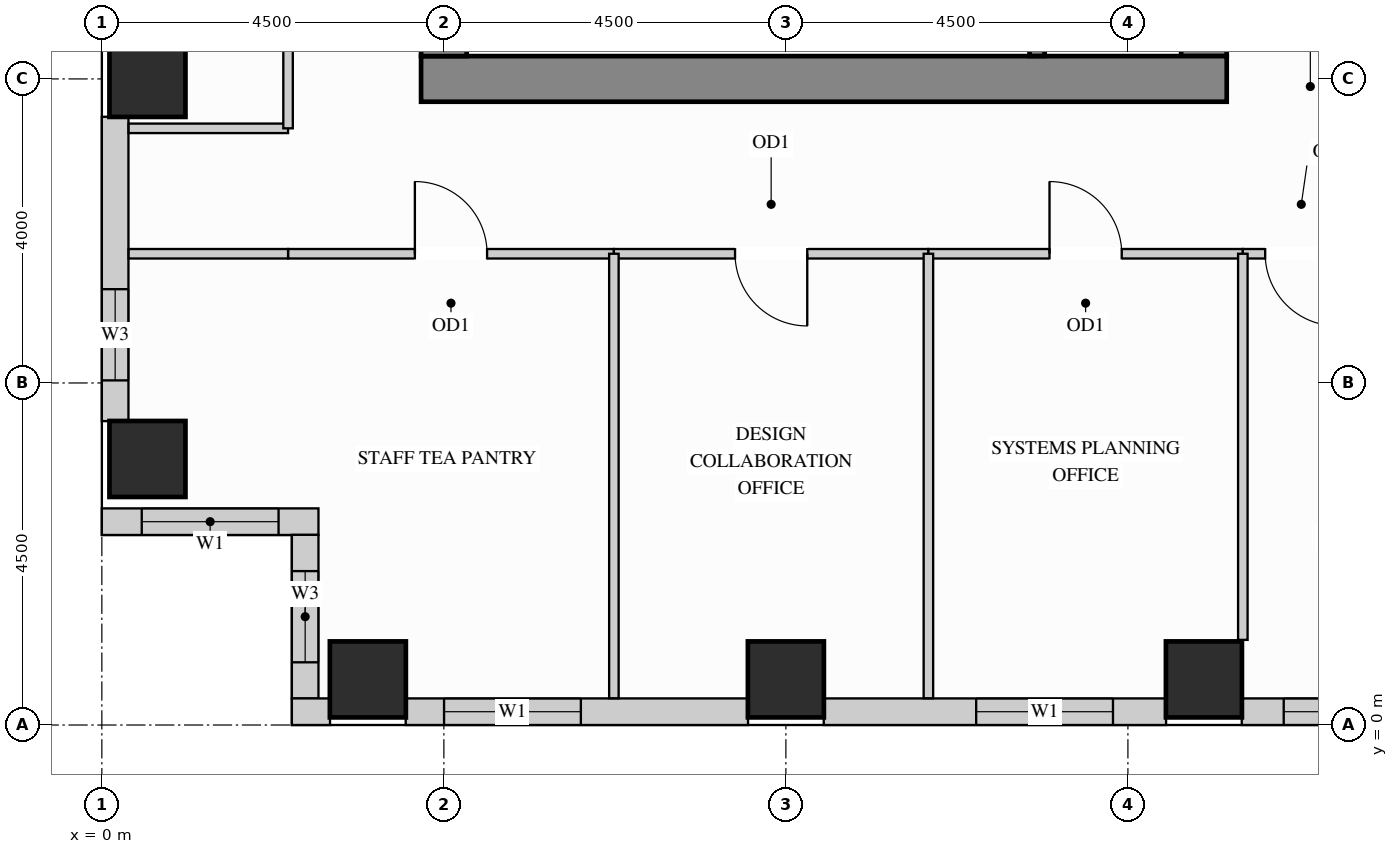
"""IFC4 building model, lengths in metres.
Left out: names, types, materials, properties, quantities, classifications, styles, units other than length and angle.
Written with IfcOpenShell. Run it as: python <this file> out.ifc"""

import sys

from ifc_helpers import new_model, si_unit, direction, frame, frame_2d, origin, origin_2d, place, context, subcontext, project, spatial, rectangle, extrude, source, transform, mapped, element, fill, save


model = new_model("IFC4")
c1 = context("Model", 3, precision=1e-05, world=origin(), true_north=direction((0.0, 1.0)))
c2 = subcontext(c1, "Body", "Model", "MODEL_VIEW")
j1 = project(units=[si_unit("LENGTHUNIT", "METRE"), si_unit("PLANEANGLEUNIT", "RADIAN")], contexts=[c1])
p1 = place(None, origin())
s1 = spatial("IfcSite", under=j1, at=p1, CompositionType="ELEMENT")
p2 = place(p1, origin())
s2 = spatial("IfcBuilding", under=s1, at=p2, CompositionType="ELEMENT")
p3 = place(p2, frame((0.0, 0.0, 189.9)))
s3 = spatial("IfcBuildingStorey", under=s2, at=p3, CompositionType="ELEMENT", Elevation=189.9)
m1 = source(origin(), c2, "Body", "SweptSolid", [
    extrude(rectangle(XDim=1.0, YDim=1.0, at=origin_2d()), origin(), (0.0, 0.0, 1.0), 3.4),
])
for number, where, z_axis, x_axis in (
    (1, (14.5, 0.6, 0.0), (0.0, 0.0, 1.0), (1.0, 0.0, 0.0)),
    (2, (3.5, 0.6, 0.0), (0.0, 0.0, 1.0), (1.0, 0.0, 0.0)),
    (3, (9.0, 0.6, 0.0), (0.0, 0.0, 1.0), (1.0, 0.0, 0.0)),
    (4, (0.6, 3.5, 0.0), (0.0, 0.0, 1.0), (1.0, 0.0, 0.0)),
    (5, (0.6, 8.5, 0.0), (0.0, 0.0, 1.0), (1.0, 0.0, 0.0)),
):
    element("IfcColumn", number, at=place(p3, frame(where, z_axis=z_axis, x_axis=x_axis)), inside=s3, PredefinedType="COLUMN", context=c2, shape_type="MappedRepresentation", body=[
        mapped(m1, transform((0.0, 0.0, 0.0), x_axis=(1.0, 0.0, 0.0), y_axis=(0.0, 1.0, 0.0), z_axis=(0.0, 0.0, 1.0))),
    ])
m2 = source(origin(), c2, "Body", "SweptSolid", [
    extrude(rectangle(XDim=10.02, YDim=0.6, at=frame_2d((5.01, 0.0))), origin(), (0.0, 0.0, 1.0), 3.4),
])
p4 = place(p3, frame((14.5, 8.8, 0.0), z_axis=(0.0, 0.0, 1.0), x_axis=(0.0, 1.0, 0.0)))
e6 = element("IfcWall", 6, at=p4, inside=s3, PredefinedType="SHEAR", context=c2, shape_type="MappedRepresentation", body=[
    mapped(m2, transform((0.0, 0.0, 0.0), x_axis=(1.0, 0.0, 0.0), y_axis=(0.0, 1.0, 0.0), z_axis=(0.0, 0.0, 1.0))),
])
m3 = source(origin(), c2, "Body", "SweptSolid", [
    extrude(rectangle(XDim=10.6, YDim=0.6, at=frame_2d((5.3, 0.0))), origin(), (0.0, 0.0, 1.0), 3.4),
])
p5 = place(p3, frame((4.2, 8.5, 0.0), z_axis=(0.0, 0.0, 1.0), x_axis=(1.0, 0.0, 0.0)))
e7 = element("IfcWall", 7, at=p5, inside=s3, PredefinedType="SHEAR", context=c2, shape_type="MappedRepresentation", body=[
    mapped(m3, transform((0.0, 0.0, 0.0), x_axis=(1.0, 0.0, 0.0), y_axis=(0.0, 1.0, 0.0), z_axis=(0.0, 0.0, 1.0))),
])
m4 = source(origin(), c2, "Body", "SweptSolid", [
    extrude(rectangle(XDim=20.4, YDim=0.6, at=frame_2d((10.2, 0.0))), origin(), (0.0, 0.0, 1.0), 3.4),
])
p6 = place(p3, frame((4.5, 8.8, 0.0), z_axis=(0.0, 0.0, 1.0), x_axis=(0.0, 1.0, 0.0)))
e8 = element("IfcWall", 8, at=p6, inside=s3, PredefinedType="SHEAR", context=c2, shape_type="MappedRepresentation", body=[
    mapped(m4, transform((0.0, 0.0, 0.0), x_axis=(1.0, 0.0, 0.0), y_axis=(0.0, 1.0, 0.0), z_axis=(0.0, 0.0, 1.0))),
])
p7 = place(p3, frame((0.175, 8.002, 0.0), z_axis=(0.0, 0.0, 1.0), x_axis=(0.0, -1.0, 0.0)))
e9 = element("IfcWall", 9, at=p7, inside=s3, PredefinedType="SOLIDWALL", context=c2, shape_type="SweptSolid", body=[
    extrude(rectangle(XDim=4.004, YDim=0.35, at=frame_2d((2.002, 0.0))), origin(), (0.0, 0.0, 1.0), 2.612),
])
p8 = place(p7, frame((2.268, 0.0, 0.78)))
e10 = element("IfcOpeningElement", 10, at=p8, cuts=e9, PredefinedType="OPENING", context=c2, shape_type="SweptSolid", body=[
    extrude(rectangle(XDim=1.2, YDim=1.652, at=frame_2d((0.6, 0.826))), frame((0.0, 0.185, 0.0), z_axis=(0.0, -1.0, 0.0), x_axis=(1.0, 0.0, 0.0)), (0.0, 0.0, 1.0), 0.37),
])
p9 = place(p3, frame((0.0, 2.675, 0.0), z_axis=(0.0, 0.0, 1.0), x_axis=(1.0, 0.0, 0.0)))
e11 = element("IfcWall", 11, at=p9, inside=s3, PredefinedType="SOLIDWALL", context=c2, shape_type="SweptSolid", body=[
    extrude(rectangle(XDim=2.85, YDim=0.35, at=frame_2d((1.425, 0.0))), origin(), (0.0, 0.0, 1.0), 3.385),
])
p10 = place(p9, frame((0.525, 0.0, 0.78)))
e12 = element("IfcOpeningElement", 12, at=p10, cuts=e11, PredefinedType="OPENING", context=c2, shape_type="SweptSolid", body=[
    extrude(rectangle(XDim=1.8, YDim=2.1, at=frame_2d((0.9, 1.05))), frame((0.0, 0.185, 0.0), z_axis=(0.0, -1.0, 0.0), x_axis=(1.0, 0.0, 0.0)), (0.0, 0.0, 1.0), 0.37),
])
p11 = place(p3, frame((2.675, 2.502, 0.0), z_axis=(0.0, 0.0, 1.0), x_axis=(0.0, -1.0, 0.0)))
e13 = element("IfcWall", 13, at=p11, inside=s3, PredefinedType="SOLIDWALL", context=c2, shape_type="SweptSolid", body=[
    extrude(rectangle(XDim=2.154, YDim=0.35, at=frame_2d((1.077, 0.0))), origin(), (0.0, 0.0, 1.0), 3.385),
])
p12 = place(p11, frame((0.477, 0.0, 0.78)))
e14 = element("IfcOpeningElement", 14, at=p12, cuts=e13, PredefinedType="OPENING", context=c2, shape_type="SweptSolid", body=[
    extrude(rectangle(XDim=1.2, YDim=2.1, at=frame_2d((0.6, 1.05))), frame((0.0, 0.185, 0.0), z_axis=(0.0, -1.0, 0.0), x_axis=(1.0, 0.0, 0.0)), (0.0, 0.0, 1.0), 0.37),
])
m5 = source(origin(), c2, "Body", "SweptSolid", [
    extrude(rectangle(XDim=0.502, YDim=0.35, at=frame_2d((0.251, 0.0))), origin(), (0.0, 0.0, 1.0), 3.385),
])
p13 = place(p3, frame((2.5, 0.175, 0.0), z_axis=(0.0, 0.0, 1.0), x_axis=(1.0, 0.0, 0.0)))
e15 = element("IfcWall", 15, at=p13, inside=s3, PredefinedType="SOLIDWALL", context=c2, shape_type="MappedRepresentation", body=[
    mapped(m5, transform((0.0, 0.0, 0.0), x_axis=(1.0, 0.0, 0.0), y_axis=(0.0, 1.0, 0.0), z_axis=(0.0, 0.0, 1.0))),
])
p14 = place(p3, frame((3.998, 0.175, 0.0), z_axis=(0.0, 0.0, 1.0), x_axis=(1.0, 0.0, 0.0)))
e16 = element("IfcWall", 16, at=p14, inside=s3, PredefinedType="SOLIDWALL", context=c2, shape_type="SweptSolid", body=[
    extrude(rectangle(XDim=4.504, YDim=0.35, at=frame_2d((2.252, 0.0))), origin(), (0.0, 0.0, 1.0), 2.612),
])
p15 = place(p14, frame((0.504, 0.0, 0.78)))
e17 = element("IfcOpeningElement", 17, at=p15, cuts=e16, PredefinedType="OPENING", context=c2, shape_type="SweptSolid", body=[
    extrude(rectangle(XDim=1.8, YDim=1.652, at=frame_2d((0.9, 0.826))), frame((0.0, 0.185, 0.0), z_axis=(0.0, -1.0, 0.0), x_axis=(1.0, 0.0, 0.0)), (0.0, 0.0, 1.0), 0.37),
])
p16 = place(p3, frame((9.498, 0.175, 0.0), z_axis=(0.0, 0.0, 1.0), x_axis=(1.0, 0.0, 0.0)))
e18 = element("IfcWall", 18, at=p16, inside=s3, PredefinedType="SOLIDWALL", context=c2, shape_type="SweptSolid", body=[
    extrude(rectangle(XDim=4.504, YDim=0.35, at=frame_2d((2.252, 0.0))), origin(), (0.0, 0.0, 1.0), 2.612),
])
p17 = place(p16, frame((2.006, 0.0, 0.78)))
e19 = element("IfcOpeningElement", 19, at=p17, cuts=e18, PredefinedType="OPENING", context=c2, shape_type="SweptSolid", body=[
    extrude(rectangle(XDim=1.8, YDim=1.652, at=frame_2d((0.9, 0.826))), frame((0.0, 0.185, 0.0), z_axis=(0.0, -1.0, 0.0), x_axis=(1.0, 0.0, 0.0)), (0.0, 0.0, 1.0), 0.37),
])
p18 = place(p3, frame((14.998, 0.175, 0.0), z_axis=(0.0, 0.0, 1.0), x_axis=(1.0, 0.0, 0.0)))
e20 = element("IfcWall", 20, at=p18, inside=s3, PredefinedType="SOLIDWALL", context=c2, shape_type="SweptSolid", body=[
    extrude(rectangle(XDim=3.504, YDim=0.35, at=frame_2d((1.752, 0.0))), origin(), (0.0, 0.0, 1.0), 2.612),
])
p19 = place(p18, frame((0.552, 0.0, 0.78)))
e21 = element("IfcOpeningElement", 21, at=p19, cuts=e20, PredefinedType="OPENING", context=c2, shape_type="SweptSolid", body=[
    extrude(rectangle(XDim=2.4, YDim=1.652, at=frame_2d((1.2, 0.826))), frame((0.0, 0.185, 0.0), z_axis=(0.0, -1.0, 0.0), x_axis=(1.0, 0.0, 0.0)), (0.0, 0.0, 1.0), 0.37),
])
m6 = source(origin(), c2, "Body", "SweptSolid", [
    extrude(rectangle(XDim=2.098, YDim=0.125, at=frame_2d((1.049, 0.0))), origin(), (0.0, 0.0, 1.0), 3.385),
])
p20 = place(p3, frame((0.352, 7.85, 0.0), z_axis=(0.0, 0.0, 1.0), x_axis=(1.0, 0.0, 0.0)))
e22 = element("IfcWall", 22, at=p20, inside=s3, PredefinedType="PARTITIONING", context=c2, shape_type="MappedRepresentation", body=[
    mapped(m6, transform((0.0, 0.0, 0.0), x_axis=(1.0, 0.0, 0.0), y_axis=(0.0, 1.0, 0.0), z_axis=(0.0, 0.0, 1.0))),
])
p21 = place(p3, frame((2.45, 6.2, 0.0), z_axis=(0.0, 0.0, 1.0), x_axis=(1.0, 0.0, 0.0)))
e23 = element("IfcWall", 23, at=p21, inside=s3, PredefinedType="PARTITIONING", context=c2, shape_type="SweptSolid", body=[
    extrude(rectangle(XDim=4.287, YDim=0.125, at=frame_2d((2.144, 0.0))), origin(), (0.0, 0.0, 1.0), 2.848),
])
p22 = place(p21, frame((1.668, 0.0, 0.0)))
e24 = element("IfcOpeningElement", 24, at=p22, cuts=e23, PredefinedType="OPENING", context=c2, shape_type="SweptSolid", body=[
    extrude(rectangle(XDim=0.95, YDim=2.15, at=frame_2d((0.475, 1.075))), frame((0.0, 0.073, 0.0), z_axis=(0.0, -1.0, 0.0), x_axis=(1.0, 0.0, 0.0)), (0.0, 0.0, 1.0), 0.145),
])
p23 = place(p3, frame((6.737, 6.2, 0.0), z_axis=(0.0, 0.0, 1.0), x_axis=(1.0, 0.0, 0.0)))
e25 = element("IfcWall", 25, at=p23, inside=s3, PredefinedType="PARTITIONING", context=c2, shape_type="SweptSolid", body=[
    extrude(rectangle(XDim=4.138, YDim=0.125, at=frame_2d((2.069, 0.0))), origin(), (0.0, 0.0, 1.0), 2.848),
])
p24 = place(p23, frame((1.594, 0.0, 0.0)))
e26 = element("IfcOpeningElement", 26, at=p24, cuts=e25, PredefinedType="OPENING", context=c2, shape_type="SweptSolid", body=[
    extrude(rectangle(XDim=0.95, YDim=2.15, at=frame_2d((0.475, 1.075))), frame((0.0, 0.073, 0.0), z_axis=(0.0, -1.0, 0.0), x_axis=(1.0, 0.0, 0.0)), (0.0, 0.0, 1.0), 0.145),
])
p25 = place(p3, frame((10.875, 6.2, 0.0), z_axis=(0.0, 0.0, 1.0), x_axis=(1.0, 0.0, 0.0)))
e27 = element("IfcWall", 27, at=p25, inside=s3, PredefinedType="PARTITIONING", context=c2, shape_type="SweptSolid", body=[
    extrude(rectangle(XDim=4.137, YDim=0.125, at=frame_2d((2.068, 0.0))), origin(), (0.0, 0.0, 1.0), 2.848),
])
p26 = place(p25, frame((1.594, 0.0, 0.0)))
e28 = element("IfcOpeningElement", 28, at=p26, cuts=e27, PredefinedType="OPENING", context=c2, shape_type="SweptSolid", body=[
    extrude(rectangle(XDim=0.95, YDim=2.15, at=frame_2d((0.475, 1.075))), frame((0.0, 0.073, 0.0), z_axis=(0.0, -1.0, 0.0), x_axis=(1.0, 0.0, 0.0)), (0.0, 0.0, 1.0), 0.145),
])
p27 = place(p3, frame((15.012, 6.2, 0.0), z_axis=(0.0, 0.0, 1.0), x_axis=(1.0, 0.0, 0.0)))
e29 = element("IfcWall", 29, at=p27, inside=s3, PredefinedType="PARTITIONING", context=c2, shape_type="SweptSolid", body=[
    extrude(rectangle(XDim=1.538, YDim=0.125, at=frame_2d((0.769, 0.0))), origin(), (0.0, 0.0, 1.0), 2.848),
])
p28 = place(p27, frame((0.294, 0.0, 0.0)))
e30 = element("IfcOpeningElement", 30, at=p28, cuts=e29, PredefinedType="OPENING", context=c2, shape_type="SweptSolid", body=[
    extrude(rectangle(XDim=0.95, YDim=2.15, at=frame_2d((0.475, 1.075))), frame((0.0, 0.073, 0.0), z_axis=(0.0, -1.0, 0.0), x_axis=(1.0, 0.0, 0.0)), (0.0, 0.0, 1.0), 0.145),
])
m7 = source(origin(), c2, "Body", "SweptSolid", [
    extrude(rectangle(XDim=2.098, YDim=0.125, at=frame_2d((1.049, 0.0))), origin(), (0.0, 0.0, 1.0), 2.848),
])
p29 = place(p3, frame((0.352, 6.2, 0.0), z_axis=(0.0, 0.0, 1.0), x_axis=(1.0, 0.0, 0.0)))
e31 = element("IfcWall", 31, at=p29, inside=s3, PredefinedType="PARTITIONING", context=c2, shape_type="MappedRepresentation", body=[
    mapped(m7, transform((0.0, 0.0, 0.0), x_axis=(1.0, 0.0, 0.0), y_axis=(0.0, 1.0, 0.0), z_axis=(0.0, 0.0, 1.0))),
])
m8 = source(origin(), c2, "Body", "SweptSolid", [
    extrude(rectangle(XDim=5.848, YDim=0.125, at=frame_2d((2.924, 0.0))), origin(), (0.0, 0.0, 1.0), 3.385),
])
for number, where, z_axis, x_axis in (
    (32, (6.737, 0.352, 0.0), (0.0, 0.0, 1.0), (0.0, 1.0, 0.0)),
    (33, (10.875, 0.352, 0.0), (0.0, 0.0, 1.0), (0.0, 1.0, 0.0)),
):
    element("IfcWall", number, at=place(p3, frame(where, z_axis=z_axis, x_axis=x_axis)), inside=s3, PredefinedType="PARTITIONING", context=c2, shape_type="MappedRepresentation", body=[
        mapped(m8, transform((0.0, 0.0, 0.0), x_axis=(1.0, 0.0, 0.0), y_axis=(0.0, 1.0, 0.0), z_axis=(0.0, 0.0, 1.0))),
    ])
m9 = source(origin(), c2, "Body", "SweptSolid", [
    extrude(rectangle(XDim=5.08, YDim=0.125, at=frame_2d((2.54, 0.0))), origin(), (0.0, 0.0, 1.0), 3.385),
])
p30 = place(p3, frame((15.012, 1.12, 0.0), z_axis=(0.0, 0.0, 1.0), x_axis=(0.0, 1.0, 0.0)))
e34 = element("IfcWall", 34, at=p30, inside=s3, PredefinedType="PARTITIONING", context=c2, shape_type="MappedRepresentation", body=[
    mapped(m9, transform((0.0, 0.0, 0.0), x_axis=(1.0, 0.0, 0.0), y_axis=(0.0, 1.0, 0.0), z_axis=(0.0, 0.0, 1.0))),
])
p31 = place(p3, frame((2.45, 7.85, 0.0), z_axis=(0.0, 0.0, 1.0), x_axis=(0.0, 1.0, 0.0)))
e35 = element("IfcWall", 35, at=p31, inside=s3, PredefinedType="PARTITIONING", context=c2, shape_type="SweptSolid", body=[
    extrude(rectangle(XDim=7.25, YDim=0.125, at=frame_2d((3.625, 0.0))), origin(), (0.0, 0.0, 1.0), 3.385),
])
p32 = place(p31, frame((3.15, 0.0, 0.0)))
e36 = element("IfcOpeningElement", 36, at=p32, cuts=e35, PredefinedType="OPENING", context=c2, shape_type="SweptSolid", body=[
    extrude(rectangle(XDim=0.95, YDim=2.15, at=frame_2d((0.475, 1.075))), frame((0.0, 0.073, 0.0), z_axis=(0.0, -1.0, 0.0), x_axis=(1.0, 0.0, 0.0)), (0.0, 0.0, 1.0), 0.145),
])
m10 = source(origin(), c2, "Body", "SweptSolid", [
    extrude(rectangle(XDim=3.753, YDim=0.2, at=frame_2d((1.876, 0.0))), origin(), (0.0, 0.0, 1.0), 3.4),
])
p33 = place(p3, frame((12.305, 8.802, 0.0), z_axis=(0.0, 0.0, 1.0), x_axis=(0.0, 1.0, 0.0)))
e37 = element("IfcWall", 37, at=p33, inside=s3, PredefinedType="SHEAR", context=c2, shape_type="MappedRepresentation", body=[
    mapped(m10, transform((0.0, 0.0, 0.0), x_axis=(1.0, 0.0, 0.0), y_axis=(0.0, 1.0, 0.0), z_axis=(0.0, 0.0, 1.0))),
])
m11 = source(origin(), c2, "Body", "SweptSolid", [
    extrude(rectangle(XDim=0.95, YDim=2.15, at=frame_2d((0.475, 1.075))), frame((0.0, 0.025, 0.0), z_axis=(0.0, -1.0, 0.0), x_axis=(1.0, 0.0, 0.0)), (0.0, 0.0, 1.0), 0.05),
])
p34 = place(p22, origin())
e38 = element("IfcDoor", 38, at=p34, inside=s3, OperationType="SINGLE_SWING_LEFT", PredefinedType="DOOR", context=c2, shape_type="MappedRepresentation", body=[
    mapped(m11, transform((0.0, 0.0, 0.0), x_axis=(1.0, 0.0, 0.0), y_axis=(0.0, 1.0, 0.0), z_axis=(0.0, 0.0, 1.0))),
])
fill(e24, e38)
p35 = place(p24, origin())
e39 = element("IfcDoor", 39, at=p35, inside=s3, OperationType="SINGLE_SWING_RIGHT", PredefinedType="DOOR", context=c2, shape_type="MappedRepresentation", body=[
    mapped(m11, transform((0.0, 0.0, 0.0), x_axis=(1.0, 0.0, 0.0), y_axis=(0.0, 1.0, 0.0), z_axis=(0.0, 0.0, 1.0))),
])
fill(e26, e39)
p36 = place(p26, origin())
e40 = element("IfcDoor", 40, at=p36, inside=s3, OperationType="SINGLE_SWING_LEFT", PredefinedType="DOOR", context=c2, shape_type="MappedRepresentation", body=[
    mapped(m11, transform((0.0, 0.0, 0.0), x_axis=(1.0, 0.0, 0.0), y_axis=(0.0, 1.0, 0.0), z_axis=(0.0, 0.0, 1.0))),
])
fill(e28, e40)
p37 = place(p28, origin())
e41 = element("IfcDoor", 41, at=p37, inside=s3, OperationType="SINGLE_SWING_RIGHT", PredefinedType="DOOR", context=c2, shape_type="MappedRepresentation", body=[
    mapped(m11, transform((0.0, 0.0, 0.0), x_axis=(1.0, 0.0, 0.0), y_axis=(0.0, 1.0, 0.0), z_axis=(0.0, 0.0, 1.0))),
])
fill(e30, e41)
m12 = source(origin(), c2, "Body", "SweptSolid", [
    extrude(rectangle(XDim=1.8, YDim=2.1, at=frame_2d((0.9, 1.05))), frame((0.0, 0.03, 0.0), z_axis=(0.0, -1.0, 0.0), x_axis=(1.0, 0.0, 0.0)), (0.0, 0.0, 1.0), 0.06),
])
p38 = place(p10, origin())
e42 = element("IfcWindow", 42, at=p38, inside=s3, PartitioningType="SINGLE_PANEL", PredefinedType="WINDOW", context=c2, shape_type="MappedRepresentation", body=[
    mapped(m12, transform((0.0, 0.0, 0.0), x_axis=(1.0, 0.0, 0.0), y_axis=(0.0, 1.0, 0.0), z_axis=(0.0, 0.0, 1.0))),
])
fill(e12, e42)
m13 = source(origin(), c2, "Body", "SweptSolid", [
    extrude(rectangle(XDim=1.8, YDim=1.652, at=frame_2d((0.9, 0.826))), frame((0.0, 0.03, 0.0), z_axis=(0.0, -1.0, 0.0), x_axis=(1.0, 0.0, 0.0)), (0.0, 0.0, 1.0), 0.06),
])
p39 = place(p15, origin())
e43 = element("IfcWindow", 43, at=p39, inside=s3, PartitioningType="SINGLE_PANEL", PredefinedType="WINDOW", context=c2, shape_type="MappedRepresentation", body=[
    mapped(m13, transform((0.0, 0.0, 0.0), x_axis=(1.0, 0.0, 0.0), y_axis=(0.0, 1.0, 0.0), z_axis=(0.0, 0.0, 1.0))),
])
fill(e17, e43)
p40 = place(p17, origin())
e44 = element("IfcWindow", 44, at=p40, inside=s3, PartitioningType="SINGLE_PANEL", PredefinedType="WINDOW", context=c2, shape_type="MappedRepresentation", body=[
    mapped(m13, transform((0.0, 0.0, 0.0), x_axis=(1.0, 0.0, 0.0), y_axis=(0.0, 1.0, 0.0), z_axis=(0.0, 0.0, 1.0))),
])
fill(e19, e44)
m14 = source(origin(), c2, "Body", "SweptSolid", [
    extrude(rectangle(XDim=2.4, YDim=1.652, at=frame_2d((1.2, 0.826))), frame((0.0, 0.03, 0.0), z_axis=(0.0, -1.0, 0.0), x_axis=(1.0, 0.0, 0.0)), (0.0, 0.0, 1.0), 0.06),
])
p41 = place(p19, origin())
e45 = element("IfcWindow", 45, at=p41, inside=s3, PartitioningType="SINGLE_PANEL", PredefinedType="WINDOW", context=c2, shape_type="MappedRepresentation", body=[
    mapped(m14, transform((0.0, 0.0, 0.0), x_axis=(1.0, 0.0, 0.0), y_axis=(0.0, 1.0, 0.0), z_axis=(0.0, 0.0, 1.0))),
])
fill(e21, e45)
m15 = source(origin(), c2, "Body", "SweptSolid", [
    extrude(rectangle(XDim=1.2, YDim=1.652, at=frame_2d((0.6, 0.826))), frame((0.0, 0.03, 0.0), z_axis=(0.0, -1.0, 0.0), x_axis=(1.0, 0.0, 0.0)), (0.0, 0.0, 1.0), 0.06),
])
p42 = place(p8, origin())
e46 = element("IfcWindow", 46, at=p42, inside=s3, PartitioningType="SINGLE_PANEL", PredefinedType="WINDOW", context=c2, shape_type="MappedRepresentation", body=[
    mapped(m15, transform((0.0, 0.0, 0.0), x_axis=(1.0, 0.0, 0.0), y_axis=(0.0, 1.0, 0.0), z_axis=(0.0, 0.0, 1.0))),
])
fill(e10, e46)
m16 = source(origin(), c2, "Body", "SweptSolid", [
    extrude(rectangle(XDim=1.2, YDim=2.1, at=frame_2d((0.6, 1.05))), frame((0.0, 0.03, 0.0), z_axis=(0.0, -1.0, 0.0), x_axis=(1.0, 0.0, 0.0)), (0.0, 0.0, 1.0), 0.06),
])
p43 = place(p12, origin())
e47 = element("IfcWindow", 47, at=p43, inside=s3, PartitioningType="SINGLE_PANEL", PredefinedType="WINDOW", context=c2, shape_type="MappedRepresentation", body=[
    mapped(m16, transform((0.0, 0.0, 0.0), x_axis=(1.0, 0.0, 0.0), y_axis=(0.0, 1.0, 0.0), z_axis=(0.0, 0.0, 1.0))),
])
fill(e14, e47)
save(model, sys.argv[1])
